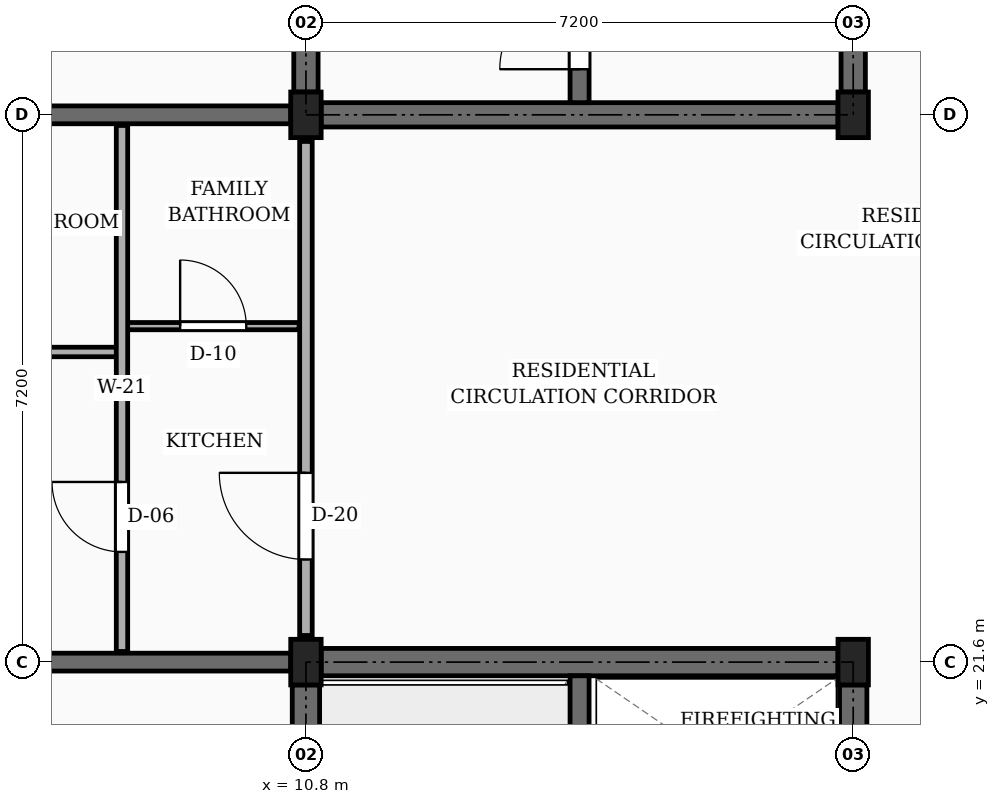
"""IFC4 building model, lengths in metres.
Left out: names, types, materials, properties, quantities, classifications, styles, units other than length and angle.
Written with IfcOpenShell. Run it as: python <this file> out.ifc"""

import sys

from ifc_helpers import new_model, si_unit, direction, frame, frame_2d, origin, origin_2d, place, context, subcontext, project, spatial, rectangle, extrude, element, fill, save


model = new_model("IFC4")
c1 = context("Model", 3, precision=1e-05, world=origin(), true_north=direction((0.0, 1.0)))
c2 = subcontext(c1, "Body", "Model", "MODEL_VIEW")
j1 = project(units=[si_unit("LENGTHUNIT", "METRE"), si_unit("PLANEANGLEUNIT", "RADIAN")], contexts=[c1])
p1 = place(None, origin())
s1 = spatial("IfcSite", under=j1, at=p1, CompositionType="ELEMENT")
p2 = place(p1, origin())
s2 = spatial("IfcBuilding", under=s1, at=p2, CompositionType="ELEMENT")
p3 = place(p2, frame((0.0, 0.0, 23.4)))
s3 = spatial("IfcBuildingStorey", under=s2, at=p3, CompositionType="ELEMENT", Elevation=23.4)
for number, where, z_axis, x_axis in (
    (1, (10.8, 21.6, 0.0), (0.0, 0.0, 1.0), (1.0, 0.0, 0.0)),
    (2, (10.8, 28.8, 0.0), (0.0, 0.0, 1.0), (1.0, 0.0, 0.0)),
    (3, (18.0, 21.6, 0.0), (0.0, 0.0, 1.0), (1.0, 0.0, 0.0)),
    (4, (18.0, 28.8, 0.0), (0.0, 0.0, 1.0), (1.0, 0.0, 0.0)),
):
    element("IfcColumn", number, at=place(p3, frame(where, z_axis=z_axis, x_axis=x_axis)), inside=s3, PredefinedType="COLUMN", context=c2, shape_type="SweptSolid", body=[
        extrude(rectangle(XDim=0.4, YDim=0.6, at=origin_2d()), origin(), (0.0, 0.0, 1.0), 3.15),
    ])
p4 = place(p3, frame((3.85, 21.6, 0.0), z_axis=(0.0, 0.0, 1.0), x_axis=(1.0, 0.0, 0.0)))
e5 = element("IfcWall", 5, at=p4, inside=s3, PredefinedType="SOLIDWALL", context=c2, shape_type="SweptSolid", body=[
    extrude(rectangle(XDim=6.75, YDim=0.235, at=frame_2d((3.375, 0.0))), origin(), (0.0, 0.0, 1.0), 2.17),
])
p5 = place(p3, frame((3.85, 28.8, 0.0), z_axis=(0.0, 0.0, 1.0), x_axis=(1.0, 0.0, 0.0)))
e6 = element("IfcWall", 6, at=p5, inside=s3, PredefinedType="SOLIDWALL", context=c2, shape_type="SweptSolid", body=[
    extrude(rectangle(XDim=6.75, YDim=0.235, at=frame_2d((3.375, 0.0))), origin(), (0.0, 0.0, 1.0), 2.17),
])
p6 = place(p5, frame((1.35, 0.0, 0.0)))
e7 = element("IfcOpeningElement", 7, at=p6, cuts=e6, PredefinedType="OPENING", context=c2, shape_type="SweptSolid", body=[
    extrude(rectangle(XDim=0.98, YDim=2.12, at=frame_2d((0.49, 1.06))), frame((0.0, 0.127, 0.0), z_axis=(0.0, -1.0, 0.0), x_axis=(1.0, 0.0, 0.0)), (0.0, 0.0, 1.0), 0.255),
])
p7 = place(p3, frame((10.8, 14.7, 0.0), z_axis=(0.0, 0.0, 1.0), x_axis=(0.0, 1.0, 0.0)))
e8 = element("IfcWall", 8, at=p7, inside=s3, PredefinedType="SHEAR", context=c2, shape_type="SweptSolid", body=[
    extrude(rectangle(XDim=6.6, YDim=0.36, at=frame_2d((3.3, 0.0))), origin(), (0.0, 0.0, 1.0), 2.87),
])
p8 = place(p3, frame((11.0, 21.6, 0.0), z_axis=(0.0, 0.0, 1.0), x_axis=(1.0, 0.0, 0.0)))
e9 = element("IfcWall", 9, at=p8, inside=s3, PredefinedType="SHEAR", context=c2, shape_type="SweptSolid", body=[
    extrude(rectangle(XDim=6.8, YDim=0.36, at=frame_2d((3.4, 0.0))), origin(), (0.0, 0.0, 1.0), 2.87),
])
p9 = place(p3, frame((18.0, 14.7, 0.0), z_axis=(0.0, 0.0, 1.0), x_axis=(0.0, 1.0, 0.0)))
e10 = element("IfcWall", 10, at=p9, inside=s3, PredefinedType="SHEAR", context=c2, shape_type="SweptSolid", body=[
    extrude(rectangle(XDim=6.6, YDim=0.36, at=frame_2d((3.3, 0.0))), origin(), (0.0, 0.0, 1.0), 2.87),
])
p10 = place(p9, frame((1.5, 0.0, 0.0)))
e11 = element("IfcOpeningElement", 11, at=p10, cuts=e10, PredefinedType="OPENING", context=c2, shape_type="SweptSolid", body=[
    extrude(rectangle(XDim=1.1, YDim=2.15, at=frame_2d((0.55, 1.075))), frame((0.0, 0.19, 0.0), z_axis=(0.0, -1.0, 0.0), x_axis=(1.0, 0.0, 0.0)), (0.0, 0.0, 1.0), 0.38),
])
p11 = place(p3, frame((14.4, 14.58, 0.0), z_axis=(0.0, 0.0, 1.0), x_axis=(0.0, 1.0, 0.0)))
e12 = element("IfcWall", 12, at=p11, inside=s3, PredefinedType="SHEAR", context=c2, shape_type="SweptSolid", body=[
    extrude(rectangle(XDim=6.84, YDim=0.25, at=frame_2d((3.42, 0.0))), origin(), (0.0, 0.0, 1.0), 2.87),
])
p12 = place(p11, frame((0.42, 0.0, 0.0)))
e13 = element("IfcOpeningElement", 13, at=p12, cuts=e12, PredefinedType="OPENING", context=c2, shape_type="SweptSolid", body=[
    extrude(rectangle(XDim=1.05, YDim=2.15, at=frame_2d((0.525, 1.075))), frame((0.0, 0.135, 0.0), z_axis=(0.0, -1.0, 0.0), x_axis=(1.0, 0.0, 0.0)), (0.0, 0.0, 1.0), 0.27),
])
p13 = place(p3, frame((10.8, 29.1, 0.0), z_axis=(0.0, 0.0, 1.0), x_axis=(0.0, 1.0, 0.0)))
e14 = element("IfcWall", 14, at=p13, inside=s3, PredefinedType="SHEAR", context=c2, shape_type="SweptSolid", body=[
    extrude(rectangle(XDim=6.6, YDim=0.32, at=frame_2d((3.3, 0.0))), origin(), (0.0, 0.0, 1.0), 2.87),
])
p14 = place(p3, frame((18.0, 29.1, 0.0), z_axis=(0.0, 0.0, 1.0), x_axis=(0.0, 1.0, 0.0)))
e15 = element("IfcWall", 15, at=p14, inside=s3, PredefinedType="SHEAR", context=c2, shape_type="SweptSolid", body=[
    extrude(rectangle(XDim=6.6, YDim=0.32, at=frame_2d((3.3, 0.0))), origin(), (0.0, 0.0, 1.0), 2.87),
])
p15 = place(p14, frame((1.5, 0.0, 0.0)))
e16 = element("IfcOpeningElement", 16, at=p15, cuts=e15, PredefinedType="OPENING", context=c2, shape_type="SweptSolid", body=[
    extrude(rectangle(XDim=1.1, YDim=2.15, at=frame_2d((0.55, 1.075))), frame((0.0, 0.17, 0.0), z_axis=(0.0, -1.0, 0.0), x_axis=(1.0, 0.0, 0.0)), (0.0, 0.0, 1.0), 0.34),
])
p16 = place(p3, frame((11.0, 28.8, 0.0), z_axis=(0.0, 0.0, 1.0), x_axis=(1.0, 0.0, 0.0)))
e17 = element("IfcWall", 17, at=p16, inside=s3, PredefinedType="SHEAR", context=c2, shape_type="SweptSolid", body=[
    extrude(rectangle(XDim=6.8, YDim=0.32, at=frame_2d((3.4, 0.0))), origin(), (0.0, 0.0, 1.0), 2.87),
])
p17 = place(p3, frame((14.4, 28.96, 0.0), z_axis=(0.0, 0.0, 1.0), x_axis=(0.0, 1.0, 0.0)))
e18 = element("IfcWall", 18, at=p17, inside=s3, PredefinedType="SHEAR", context=c2, shape_type="SweptSolid", body=[
    extrude(rectangle(XDim=6.88, YDim=0.25, at=frame_2d((3.44, 0.0))), origin(), (0.0, 0.0, 1.0), 2.87),
])
p18 = place(p17, frame((0.44, 0.0, 0.0)))
e19 = element("IfcOpeningElement", 19, at=p18, cuts=e18, PredefinedType="OPENING", context=c2, shape_type="SweptSolid", body=[
    extrude(rectangle(XDim=1.05, YDim=2.15, at=frame_2d((0.525, 1.075))), frame((0.0, 0.135, 0.0), z_axis=(0.0, -1.0, 0.0), x_axis=(1.0, 0.0, 0.0)), (0.0, 0.0, 1.0), 0.27),
])
p19 = place(p3, frame((10.8, 21.95, 0.0), z_axis=(0.0, 0.0, 1.0), x_axis=(0.0, 1.0, 0.0)))
e20 = element("IfcWall", 20, at=p19, inside=s3, PredefinedType="PARTITIONING", context=c2, shape_type="SweptSolid", body=[
    extrude(rectangle(XDim=6.5, YDim=0.165, at=frame_2d((3.25, 0.0))), origin(), (0.0, 0.0, 1.0), 2.305),
])
p20 = place(p19, frame((1.0, 0.0, 0.0)))
e21 = element("IfcOpeningElement", 21, at=p20, cuts=e20, PredefinedType="OPENING", context=c2, shape_type="SweptSolid", body=[
    extrude(rectangle(XDim=1.14, YDim=2.18, at=frame_2d((0.57, 1.09))), frame((0.0, 0.093, 0.0), z_axis=(0.0, -1.0, 0.0), x_axis=(1.0, 0.0, 0.0)), (0.0, 0.0, 1.0), 0.185),
])
p21 = place(p3, frame((3.775, 25.68, 0.0), z_axis=(0.0, 0.0, 1.0), x_axis=(1.0, 0.0, 0.0)))
e22 = element("IfcWall", 22, at=p21, inside=s3, PredefinedType="PARTITIONING", context=c2, shape_type="SweptSolid", body=[
    extrude(rectangle(XDim=4.535, YDim=0.125, at=frame_2d((2.268, 0.0))), origin(), (0.0, 0.0, 1.0), 2.305),
])
p22 = place(p21, frame((1.827, 0.0, 0.0)))
e23 = element("IfcOpeningElement", 23, at=p22, cuts=e22, PredefinedType="OPENING", context=c2, shape_type="SweptSolid", body=[
    extrude(rectangle(XDim=0.88, YDim=2.08, at=frame_2d((0.44, 1.04))), frame((0.0, 0.073, 0.0), z_axis=(0.0, -1.0, 0.0), x_axis=(1.0, 0.0, 0.0)), (0.0, 0.0, 1.0), 0.145),
])
p23 = place(p3, frame((8.45, 26.02, 0.0), z_axis=(0.0, 0.0, 1.0), x_axis=(1.0, 0.0, 0.0)))
e24 = element("IfcWall", 24, at=p23, inside=s3, PredefinedType="PARTITIONING", context=c2, shape_type="SweptSolid", body=[
    extrude(rectangle(XDim=2.26, YDim=0.095, at=frame_2d((1.13, 0.0))), origin(), (0.0, 0.0, 1.0), 2.305),
])
p24 = place(p23, frame((0.695, 0.0, 0.0)))
e25 = element("IfcOpeningElement", 25, at=p24, cuts=e24, PredefinedType="OPENING", context=c2, shape_type="SweptSolid", body=[
    extrude(rectangle(XDim=0.87, YDim=2.05, at=frame_2d((0.435, 1.025))), frame((0.0, 0.058, 0.0), z_axis=(0.0, -1.0, 0.0), x_axis=(1.0, 0.0, 0.0)), (0.0, 0.0, 1.0), 0.115),
])
p25 = place(p3, frame((8.38, 21.74, 0.0), z_axis=(0.0, 0.0, 1.0), x_axis=(0.0, 1.0, 0.0)))
e26 = element("IfcWall", 26, at=p25, inside=s3, PredefinedType="PARTITIONING", context=c2, shape_type="SweptSolid", body=[
    extrude(rectangle(XDim=6.92, YDim=0.15, at=frame_2d((3.46, 0.0))), origin(), (0.0, 0.0, 1.0), 2.305),
])
p26 = place(p25, frame((1.31, 0.0, 0.0)))
e27 = element("IfcOpeningElement", 27, at=p26, cuts=e26, PredefinedType="OPENING", context=c2, shape_type="SweptSolid", body=[
    extrude(rectangle(XDim=0.92, YDim=2.1, at=frame_2d((0.46, 1.05))), frame((0.0, 0.085, 0.0), z_axis=(0.0, -1.0, 0.0), x_axis=(1.0, 0.0, 0.0)), (0.0, 0.0, 1.0), 0.17),
])
p27 = place(p18, origin())
e28 = element("IfcDoor", 28, at=p27, inside=s3, OperationType="SINGLE_SWING_LEFT", PredefinedType="DOOR", context=c2, shape_type="SweptSolid", body=[
    extrude(rectangle(XDim=1.05, YDim=2.15, at=frame_2d((0.525, 1.075))), frame((0.0, 0.025, 0.0), z_axis=(0.0, -1.0, 0.0), x_axis=(1.0, 0.0, 0.0)), (0.0, 0.0, 1.0), 0.05),
])
fill(e19, e28)
p28 = place(p20, origin())
e29 = element("IfcDoor", 29, at=p28, inside=s3, OperationType="SINGLE_SWING_RIGHT", PredefinedType="DOOR", context=c2, shape_type="SweptSolid", body=[
    extrude(rectangle(XDim=1.14, YDim=2.18, at=frame_2d((0.57, 1.09))), frame((0.0, 0.025, 0.0), z_axis=(0.0, -1.0, 0.0), x_axis=(1.0, 0.0, 0.0)), (0.0, 0.0, 1.0), 0.05),
])
fill(e21, e29)
p29 = place(p24, origin())
e30 = element("IfcDoor", 30, at=p29, inside=s3, OperationType="SINGLE_SWING_LEFT", PredefinedType="DOOR", context=c2, shape_type="SweptSolid", body=[
    extrude(rectangle(XDim=0.87, YDim=2.05, at=frame_2d((0.435, 1.025))), frame((0.0, 0.025, 0.0), z_axis=(0.0, -1.0, 0.0), x_axis=(1.0, 0.0, 0.0)), (0.0, 0.0, 1.0), 0.05),
])
fill(e25, e30)
p30 = place(p26, origin())
e31 = element("IfcDoor", 31, at=p30, inside=s3, OperationType="SINGLE_SWING_RIGHT", PredefinedType="DOOR", context=c2, shape_type="SweptSolid", body=[
    extrude(rectangle(XDim=0.92, YDim=2.1, at=frame_2d((0.46, 1.05))), frame((0.0, 0.025, 0.0), z_axis=(0.0, -1.0, 0.0), x_axis=(1.0, 0.0, 0.0)), (0.0, 0.0, 1.0), 0.05),
])
fill(e27, e31)
save(model, sys.argv[1])
